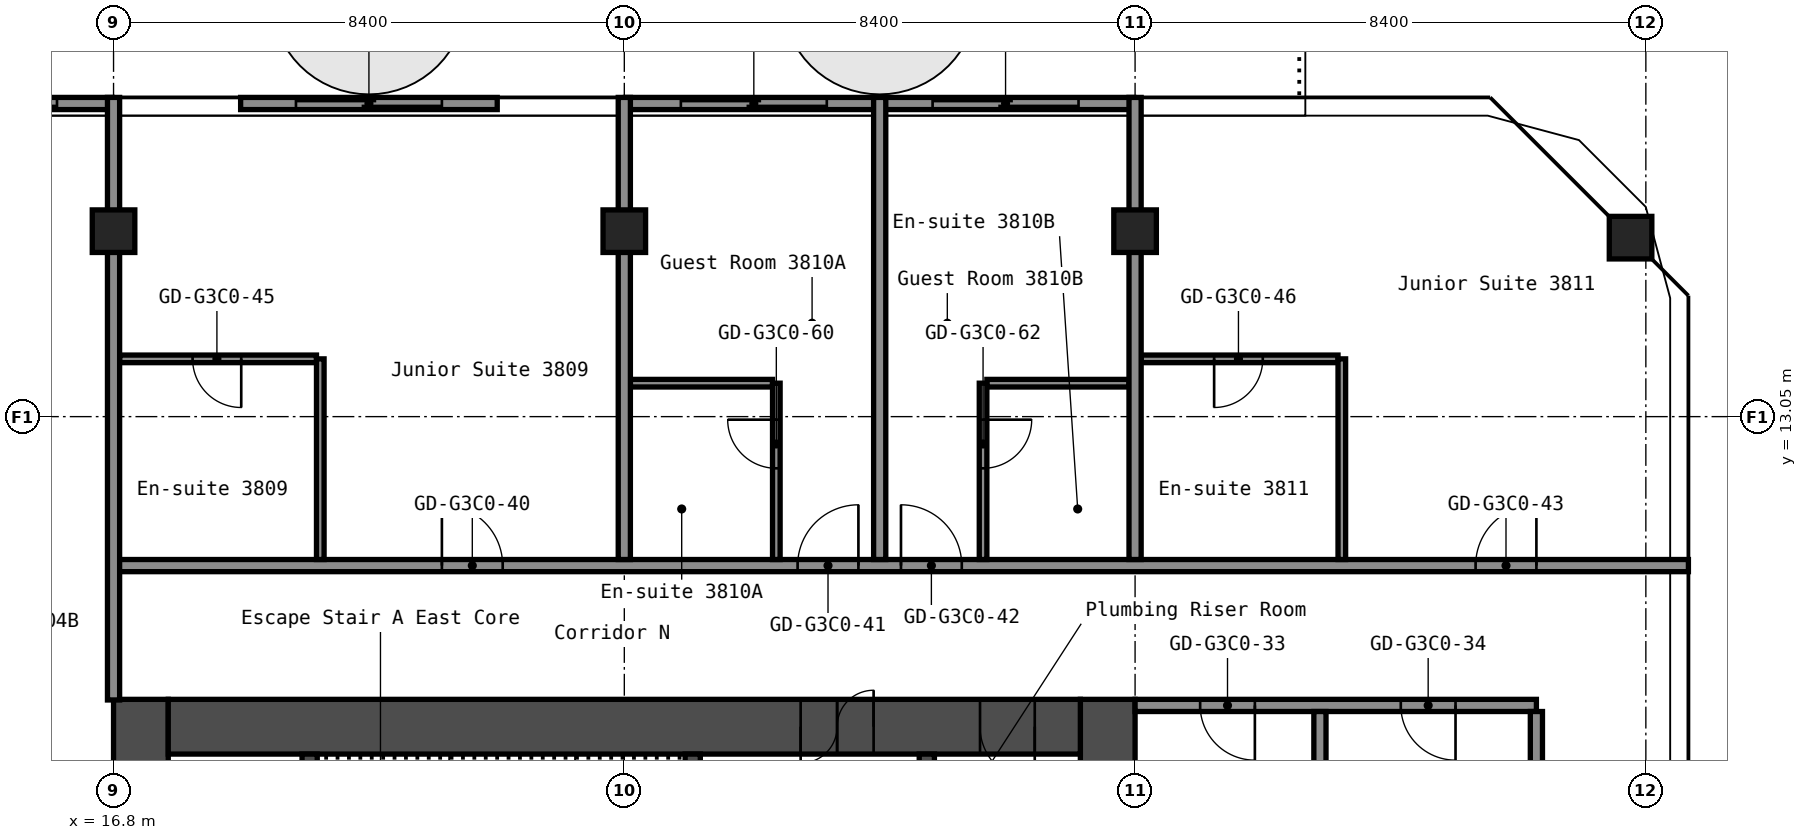
"""IFC4 building model, lengths in metres.
Left out: names, types, materials, properties, quantities, classifications, styles, units other than length and angle.
Written with IfcOpenShell. Run it as: python <this file> out.ifc"""

import sys

from ifc_helpers import new_model, si_unit, direction, frame, frame_2d, origin, origin_2d, place, context, subcontext, project, spatial, rectangle, hollow_rectangle, extrude, element, fill, save


model = new_model("IFC4")
c1 = context("Model", 3, precision=1e-05, world=origin(), true_north=direction((0.0, 1.0)))
c2 = subcontext(c1, "Body", "Model", "MODEL_VIEW")
j1 = project(units=[si_unit("LENGTHUNIT", "METRE"), si_unit("PLANEANGLEUNIT", "RADIAN")], contexts=[c1])
p1 = place(None, origin())
s1 = spatial("IfcSite", under=j1, at=p1, CompositionType="ELEMENT")
p2 = place(p1, origin())
s2 = spatial("IfcBuilding", under=s1, at=p2, CompositionType="ELEMENT")
p3 = place(p2, frame((0.0, 0.0, 137.4)))
s3 = spatial("IfcBuildingStorey", under=s2, at=p3, CompositionType="ELEMENT", Elevation=137.4)
for number, where, z_axis, x_axis in (
    (1, (16.8, 16.1, 0.0), (0.0, 0.0, 1.0), (1.0, 0.0, 0.0)),
    (2, (25.2, 16.1, 0.0), (0.0, 0.0, 1.0), (1.0, 0.0, 0.0)),
    (3, (33.6, 16.1, 0.0), (0.0, 0.0, 1.0), (1.0, 0.0, 0.0)),
    (4, (41.749, 15.994, 0.0), (0.0, 0.0, 1.0), (1.0, 0.0, 0.0)),
):
    element("IfcColumn", number, at=place(p3, frame(where, z_axis=z_axis, x_axis=x_axis)), inside=s3, PredefinedType="COLUMN", context=c2, shape_type="SweptSolid", body=[
        extrude(hollow_rectangle(XDim=0.7, YDim=0.7, WallThickness=0.028, at=origin_2d()), origin(), (0.0, 0.0, 1.0), 2.75),
    ])
p4 = place(p3, frame((17.25, -8.4, 0.0), z_axis=(0.0, 0.0, 1.0), x_axis=(0.0, 1.0, 0.0)))
e5 = element("IfcWall", 5, at=p4, inside=s3, PredefinedType="SHEAR", context=c2, shape_type="SweptSolid", body=[
    extrude(rectangle(XDim=16.8, YDim=0.9, at=frame_2d((8.4, 0.0))), origin(), (0.0, 0.0, 1.0), 2.75),
])
p5 = place(p4, frame((7.1, 0.0, 0.0)))
e6 = element("IfcOpeningElement", 6, at=p5, cuts=e5, PredefinedType="OPENING", context=c2, shape_type="SweptSolid", body=[
    extrude(rectangle(XDim=1.6, YDim=2.1, at=frame_2d((0.8, 1.05))), frame((0.0, 0.46, 0.0), z_axis=(0.0, -1.0, 0.0), x_axis=(1.0, 0.0, 0.0)), (0.0, 0.0, 1.0), 0.92),
])
p6 = place(p3, frame((33.15, -8.4, 0.0), z_axis=(0.0, 0.0, 1.0), x_axis=(0.0, 1.0, 0.0)))
e7 = element("IfcWall", 7, at=p6, inside=s3, PredefinedType="SHEAR", context=c2, shape_type="SweptSolid", body=[
    extrude(rectangle(XDim=16.8, YDim=0.9, at=frame_2d((8.4, 0.0))), origin(), (0.0, 0.0, 1.0), 2.75),
])
p7 = place(p3, frame((17.7, 7.95, 0.0), z_axis=(0.0, 0.0, 1.0), x_axis=(1.0, 0.0, 0.0)))
e8 = element("IfcWall", 8, at=p7, inside=s3, PredefinedType="SHEAR", context=c2, shape_type="SweptSolid", body=[
    extrude(rectangle(XDim=15.0, YDim=0.9, at=frame_2d((7.5, 0.0))), origin(), (0.0, 0.0, 1.0), 2.75),
])
p8 = place(p7, frame((10.4, 0.0, 0.0)))
e9 = element("IfcOpeningElement", 9, at=p8, cuts=e8, PredefinedType="OPENING", context=c2, shape_type="SweptSolid", body=[
    extrude(rectangle(XDim=1.2, YDim=2.1, at=frame_2d((0.6, 1.05))), frame((0.0, 0.46, 0.0), z_axis=(0.0, -1.0, 0.0), x_axis=(1.0, 0.0, 0.0)), (0.0, 0.0, 1.0), 0.92),
])
p9 = place(p7, frame((13.35, 0.0, 0.0)))
e10 = element("IfcOpeningElement", 10, at=p9, cuts=e8, PredefinedType="OPENING", context=c2, shape_type="SweptSolid", body=[
    extrude(rectangle(XDim=0.9, YDim=2.1, at=frame_2d((0.45, 1.05))), frame((0.0, 0.46, 0.0), z_axis=(0.0, -1.0, 0.0), x_axis=(1.0, 0.0, 0.0)), (0.0, 0.0, 1.0), 0.92),
])
p10 = place(p3, frame((20.025, 1.2, 0.0), z_axis=(0.0, 0.0, 1.0), x_axis=(0.0, 1.0, 0.0)))
e11 = element("IfcWall", 11, at=p10, inside=s3, PredefinedType="SHEAR", context=c2, shape_type="SweptSolid", body=[
    extrude(rectangle(XDim=6.3, YDim=0.25, at=frame_2d((3.15, 0.0))), origin(), (0.0, 0.0, 1.0), 2.75),
])
p11 = place(p3, frame((26.325, 3.75, 0.0), z_axis=(0.0, 0.0, 1.0), x_axis=(0.0, 1.0, 0.0)))
e12 = element("IfcWall", 12, at=p11, inside=s3, PredefinedType="SHEAR", context=c2, shape_type="SweptSolid", body=[
    extrude(rectangle(XDim=3.75, YDim=0.25, at=frame_2d((1.875, 0.0))), origin(), (0.0, 0.0, 1.0), 2.75),
])
p12 = place(p11, frame((1.25, 0.0, 0.0)))
e13 = element("IfcOpeningElement", 13, at=p12, cuts=e12, PredefinedType="OPENING", context=c2, shape_type="SweptSolid", body=[
    extrude(rectangle(XDim=1.2, YDim=2.1, at=frame_2d((0.6, 1.05))), frame((0.0, 0.135, 0.0), z_axis=(0.0, -1.0, 0.0), x_axis=(1.0, 0.0, 0.0)), (0.0, 0.0, 1.0), 0.27),
])
p13 = place(p3, frame((30.175, 1.45, 0.0), z_axis=(0.0, 0.0, 1.0), x_axis=(0.0, 1.0, 0.0)))
e14 = element("IfcWall", 14, at=p13, inside=s3, PredefinedType="SHEAR", context=c2, shape_type="SweptSolid", body=[
    extrude(rectangle(XDim=6.05, YDim=0.25, at=frame_2d((3.025, 0.0))), origin(), (0.0, 0.0, 1.0), 2.75),
])
p14 = place(p13, frame((2.625, 0.0, 0.0)))
e15 = element("IfcOpeningElement", 15, at=p14, cuts=e14, PredefinedType="OPENING", context=c2, shape_type="SweptSolid", body=[
    extrude(rectangle(XDim=1.1, YDim=2.1, at=frame_2d((0.55, 1.05))), frame((0.0, 0.135, 0.0), z_axis=(0.0, -1.0, 0.0), x_axis=(1.0, 0.0, 0.0)), (0.0, 0.0, 1.0), 0.27),
])
p15 = place(p3, frame((33.6, 8.3, 0.0), z_axis=(0.0, 0.0, 1.0), x_axis=(1.0, 0.0, 0.0)))
e16 = element("IfcWall", 16, at=p15, inside=s3, PredefinedType="PARTITIONING", context=c2, shape_type="SweptSolid", body=[
    extrude(rectangle(XDim=6.6, YDim=0.2, at=frame_2d((3.3, 0.0))), origin(), (0.0, 0.0, 1.0), 2.75),
])
p16 = place(p15, frame((1.07, 0.0, 0.0)))
e17 = element("IfcOpeningElement", 17, at=p16, cuts=e16, PredefinedType="OPENING", context=c2, shape_type="SweptSolid", body=[
    extrude(rectangle(XDim=0.9, YDim=2.1, at=frame_2d((0.45, 1.05))), frame((0.0, 0.11, 0.0), z_axis=(0.0, -1.0, 0.0), x_axis=(1.0, 0.0, 0.0)), (0.0, 0.0, 1.0), 0.22),
])
p17 = place(p15, frame((4.37, 0.0, 0.0)))
e18 = element("IfcOpeningElement", 18, at=p17, cuts=e16, PredefinedType="OPENING", context=c2, shape_type="SweptSolid", body=[
    extrude(rectangle(XDim=0.9, YDim=2.1, at=frame_2d((0.45, 1.05))), frame((0.0, 0.11, 0.0), z_axis=(0.0, -1.0, 0.0), x_axis=(1.0, 0.0, 0.0)), (0.0, 0.0, 1.0), 0.22),
])
p18 = place(p3, frame((16.8, 10.6, 0.0), z_axis=(0.0, 0.0, 1.0), x_axis=(1.0, 0.0, 0.0)))
e19 = element("IfcWall", 19, at=p18, inside=s3, PredefinedType="PARTITIONING", context=c2, shape_type="SweptSolid", body=[
    extrude(rectangle(XDim=25.9, YDim=0.2, at=frame_2d((12.95, 0.0))), origin(), (0.0, 0.0, 1.0), 2.75),
])
p19 = place(p18, frame((5.4, 0.0, 0.0)))
e20 = element("IfcOpeningElement", 20, at=p19, cuts=e19, PredefinedType="OPENING", context=c2, shape_type="SweptSolid", body=[
    extrude(rectangle(XDim=1.0, YDim=2.1, at=frame_2d((0.5, 1.05))), frame((0.0, 0.11, 0.0), z_axis=(0.0, -1.0, 0.0), x_axis=(1.0, 0.0, 0.0)), (0.0, 0.0, 1.0), 0.22),
])
p20 = place(p18, frame((11.25, 0.0, 0.0)))
e21 = element("IfcOpeningElement", 21, at=p20, cuts=e19, PredefinedType="OPENING", context=c2, shape_type="SweptSolid", body=[
    extrude(rectangle(XDim=1.0, YDim=2.1, at=frame_2d((0.5, 1.05))), frame((0.0, 0.11, 0.0), z_axis=(0.0, -1.0, 0.0), x_axis=(1.0, 0.0, 0.0)), (0.0, 0.0, 1.0), 0.22),
])
p21 = place(p18, frame((12.95, 0.0, 0.0)))
e22 = element("IfcOpeningElement", 22, at=p21, cuts=e19, PredefinedType="OPENING", context=c2, shape_type="SweptSolid", body=[
    extrude(rectangle(XDim=1.0, YDim=2.1, at=frame_2d((0.5, 1.05))), frame((0.0, 0.11, 0.0), z_axis=(0.0, -1.0, 0.0), x_axis=(1.0, 0.0, 0.0)), (0.0, 0.0, 1.0), 0.22),
])
p22 = place(p18, frame((22.4, 0.0, 0.0)))
e23 = element("IfcOpeningElement", 23, at=p22, cuts=e19, PredefinedType="OPENING", context=c2, shape_type="SweptSolid", body=[
    extrude(rectangle(XDim=1.0, YDim=2.1, at=frame_2d((0.5, 1.05))), frame((0.0, 0.11, 0.0), z_axis=(0.0, -1.0, 0.0), x_axis=(1.0, 0.0, 0.0)), (0.0, 0.0, 1.0), 0.22),
])
for number, where, z_axis, x_axis in (
    (24, (25.3, 13.6, 0.0), (0.0, 0.0, 1.0), (1.0, 0.0, 0.0)),
    (25, (31.163, 13.6, 0.0), (0.0, 0.0, 1.0), (1.0, 0.0, 0.0)),
):
    element("IfcWall", number, at=place(p3, frame(where, z_axis=z_axis, x_axis=x_axis)), inside=s3, PredefinedType="PARTITIONING", context=c2, shape_type="SweptSolid", body=[
        extrude(rectangle(XDim=2.337, YDim=0.125, at=frame_2d((1.169, 0.0))), origin(), (0.0, 0.0, 1.0), 2.75),
    ])
p23 = place(p3, frame((16.9, 14.0, 0.0), z_axis=(0.0, 0.0, 1.0), x_axis=(1.0, 0.0, 0.0)))
e26 = element("IfcWall", 26, at=p23, inside=s3, PredefinedType="PARTITIONING", context=c2, shape_type="SweptSolid", body=[
    extrude(rectangle(XDim=3.238, YDim=0.125, at=frame_2d((1.619, 0.0))), origin(), (0.0, 0.0, 1.0), 2.75),
])
p24 = place(p23, frame((1.2, 0.0, 0.0)))
e27 = element("IfcOpeningElement", 27, at=p24, cuts=e26, PredefinedType="OPENING", context=c2, shape_type="SweptSolid", body=[
    extrude(rectangle(XDim=0.8, YDim=2.1, at=frame_2d((0.4, 1.05))), frame((0.0, 0.073, 0.0), z_axis=(0.0, -1.0, 0.0), x_axis=(1.0, 0.0, 0.0)), (0.0, 0.0, 1.0), 0.145),
])
p25 = place(p3, frame((33.7, 14.0, 0.0), z_axis=(0.0, 0.0, 1.0), x_axis=(1.0, 0.0, 0.0)))
e28 = element("IfcWall", 28, at=p25, inside=s3, PredefinedType="PARTITIONING", context=c2, shape_type="SweptSolid", body=[
    extrude(rectangle(XDim=3.238, YDim=0.125, at=frame_2d((1.619, 0.0))), origin(), (0.0, 0.0, 1.0), 2.75),
])
p26 = place(p25, frame((1.2, 0.0, 0.0)))
e29 = element("IfcOpeningElement", 29, at=p26, cuts=e28, PredefinedType="OPENING", context=c2, shape_type="SweptSolid", body=[
    extrude(rectangle(XDim=0.8, YDim=2.1, at=frame_2d((0.4, 1.05))), frame((0.0, 0.073, 0.0), z_axis=(0.0, -1.0, 0.0), x_axis=(1.0, 0.0, 0.0)), (0.0, 0.0, 1.0), 0.145),
])
p27 = place(p3, frame((16.8, 8.39, 0.0), z_axis=(0.0, 0.0, 1.0), x_axis=(0.0, 1.0, 0.0)))
e30 = element("IfcWall", 30, at=p27, inside=s3, PredefinedType="PARTITIONING", context=c2, shape_type="SweptSolid", body=[
    extrude(rectangle(XDim=9.91, YDim=0.2, at=frame_2d((4.955, 0.0))), origin(), (0.0, 0.0, 1.0), 2.75),
])
p28 = place(p3, frame((20.2, 10.7, 0.0), z_axis=(0.0, 0.0, 1.0), x_axis=(0.0, 1.0, 0.0)))
e31 = element("IfcWall", 31, at=p28, inside=s3, PredefinedType="PARTITIONING", context=c2, shape_type="SweptSolid", body=[
    extrude(rectangle(XDim=3.3, YDim=0.125, at=frame_2d((1.65, 0.0))), origin(), (0.0, 0.0, 1.0), 2.75),
])
p29 = place(p3, frame((25.2, 10.7, 0.0), z_axis=(0.0, 0.0, 1.0), x_axis=(0.0, 1.0, 0.0)))
e32 = element("IfcWall", 32, at=p29, inside=s3, PredefinedType="PARTITIONING", context=c2, shape_type="SweptSolid", body=[
    extrude(rectangle(XDim=7.6, YDim=0.2, at=frame_2d((3.8, 0.0))), origin(), (0.0, 0.0, 1.0), 2.75),
])
p30 = place(p3, frame((27.7, 10.7, 0.0), z_axis=(0.0, 0.0, 1.0), x_axis=(0.0, 1.0, 0.0)))
e33 = element("IfcWall", 33, at=p30, inside=s3, PredefinedType="PARTITIONING", context=c2, shape_type="SweptSolid", body=[
    extrude(rectangle(XDim=2.9, YDim=0.125, at=frame_2d((1.45, 0.0))), origin(), (0.0, 0.0, 1.0), 2.75),
])
p31 = place(p30, frame((1.5, 0.0, 0.0)))
e34 = element("IfcOpeningElement", 34, at=p31, cuts=e33, PredefinedType="OPENING", context=c2, shape_type="SweptSolid", body=[
    extrude(rectangle(XDim=0.8, YDim=2.1, at=frame_2d((0.4, 1.05))), frame((0.0, 0.073, 0.0), z_axis=(0.0, -1.0, 0.0), x_axis=(1.0, 0.0, 0.0)), (0.0, 0.0, 1.0), 0.145),
])
p32 = place(p3, frame((29.4, 10.7, 0.0), z_axis=(0.0, 0.0, 1.0), x_axis=(0.0, 1.0, 0.0)))
e35 = element("IfcWall", 35, at=p32, inside=s3, PredefinedType="PARTITIONING", context=c2, shape_type="SweptSolid", body=[
    extrude(rectangle(XDim=7.6, YDim=0.2, at=frame_2d((3.8, 0.0))), origin(), (0.0, 0.0, 1.0), 2.75),
])
p33 = place(p3, frame((31.1, 10.7, 0.0), z_axis=(0.0, 0.0, 1.0), x_axis=(0.0, 1.0, 0.0)))
e36 = element("IfcWall", 36, at=p33, inside=s3, PredefinedType="PARTITIONING", context=c2, shape_type="SweptSolid", body=[
    extrude(rectangle(XDim=2.9, YDim=0.125, at=frame_2d((1.45, 0.0))), origin(), (0.0, 0.0, 1.0), 2.75),
])
p34 = place(p33, frame((1.5, 0.0, 0.0)))
e37 = element("IfcOpeningElement", 37, at=p34, cuts=e36, PredefinedType="OPENING", context=c2, shape_type="SweptSolid", body=[
    extrude(rectangle(XDim=0.8, YDim=2.1, at=frame_2d((0.4, 1.05))), frame((0.0, 0.073, 0.0), z_axis=(0.0, -1.0, 0.0), x_axis=(1.0, 0.0, 0.0)), (0.0, 0.0, 1.0), 0.145),
])
p35 = place(p3, frame((33.6, 10.7, 0.0), z_axis=(0.0, 0.0, 1.0), x_axis=(0.0, 1.0, 0.0)))
e38 = element("IfcWall", 38, at=p35, inside=s3, PredefinedType="PARTITIONING", context=c2, shape_type="SweptSolid", body=[
    extrude(rectangle(XDim=7.6, YDim=0.2, at=frame_2d((3.8, 0.0))), origin(), (0.0, 0.0, 1.0), 2.75),
])
p36 = place(p3, frame((36.64, 0.0, 0.0), z_axis=(0.0, 0.0, 1.0), x_axis=(0.0, 1.0, 0.0)))
e39 = element("IfcWall", 39, at=p36, inside=s3, PredefinedType="PARTITIONING", context=c2, shape_type="SweptSolid", body=[
    extrude(rectangle(XDim=8.2, YDim=0.2, at=frame_2d((4.1, 0.0))), origin(), (0.0, 0.0, 1.0), 2.75),
])
p37 = place(p3, frame((37.0, 10.7, 0.0), z_axis=(0.0, 0.0, 1.0), x_axis=(0.0, 1.0, 0.0)))
e40 = element("IfcWall", 40, at=p37, inside=s3, PredefinedType="PARTITIONING", context=c2, shape_type="SweptSolid", body=[
    extrude(rectangle(XDim=3.3, YDim=0.125, at=frame_2d((1.65, 0.0))), origin(), (0.0, 0.0, 1.0), 2.75),
])
p38 = place(p3, frame((40.2, -8.2, 0.0), z_axis=(0.0, 0.0, 1.0), x_axis=(0.0, 1.0, 0.0)))
e41 = element("IfcWall", 41, at=p38, inside=s3, PredefinedType="PARTITIONING", context=c2, shape_type="SweptSolid", body=[
    extrude(rectangle(XDim=16.4, YDim=0.2, at=frame_2d((8.2, 0.0))), origin(), (0.0, 0.0, 1.0), 2.75),
])
p39 = place(p3, frame((33.58, 18.2, 0.0), z_axis=(0.0, 0.0, 1.0), x_axis=(-1.0, 0.0, 0.0)))
p40 = place(p39, frame((0.91, 0.0, 0.0)))
p41 = place(p40, frame((2.4, 0.0, 0.0), z_axis=(0.0, 0.0, 1.0), x_axis=(-1.0, 0.0, 0.0)))
e42 = element("IfcDoor", 42, at=p41, inside=s3, OperationType="SLIDING_TO_LEFT", PredefinedType="DOOR", context=c2, shape_type="SweptSolid", body=[
    extrude(rectangle(XDim=2.4, YDim=2.2, at=frame_2d((1.2, 1.1))), frame((0.0, 0.025, 0.0), z_axis=(0.0, -1.0, 0.0), x_axis=(1.0, 0.0, 0.0)), (0.0, 0.0, 1.0), 0.05),
])
p42 = place(p3, frame((29.44, 18.2, 0.0), z_axis=(0.0, 0.0, 1.0), x_axis=(-1.0, 0.0, 0.0)))
p43 = place(p42, frame((0.91, 0.0, 0.0)))
p44 = place(p43, frame((2.4, 0.0, 0.0), z_axis=(0.0, 0.0, 1.0), x_axis=(-1.0, 0.0, 0.0)))
e43 = element("IfcDoor", 43, at=p44, inside=s3, OperationType="SLIDING_TO_LEFT", PredefinedType="DOOR", context=c2, shape_type="SweptSolid", body=[
    extrude(rectangle(XDim=2.4, YDim=2.2, at=frame_2d((1.2, 1.1))), frame((0.0, 0.025, 0.0), z_axis=(0.0, -1.0, 0.0), x_axis=(1.0, 0.0, 0.0)), (0.0, 0.0, 1.0), 0.05),
])
p45 = place(p3, frame((23.11, 18.2, 0.0), z_axis=(0.0, 0.0, 1.0), x_axis=(-1.0, 0.0, 0.0)))
p46 = place(p45, frame((0.91, 0.0, 0.0)))
p47 = place(p46, frame((2.4, 0.0, 0.0), z_axis=(0.0, 0.0, 1.0), x_axis=(-1.0, 0.0, 0.0)))
e44 = element("IfcDoor", 44, at=p47, inside=s3, OperationType="SLIDING_TO_LEFT", PredefinedType="DOOR", context=c2, shape_type="SweptSolid", body=[
    extrude(rectangle(XDim=2.4, YDim=2.2, at=frame_2d((1.2, 1.1))), frame((0.0, 0.025, 0.0), z_axis=(0.0, -1.0, 0.0), x_axis=(1.0, 0.0, 0.0)), (0.0, 0.0, 1.0), 0.05),
])
p48 = place(p3, frame((16.78, 18.2, 0.0), z_axis=(0.0, 0.0, 1.0), x_axis=(-1.0, 0.0, 0.0)))
p49 = place(p48, frame((0.91, 0.0, 0.0)))
p50 = place(p49, frame((2.4, 0.0, 0.0), z_axis=(0.0, 0.0, 1.0), x_axis=(-1.0, 0.0, 0.0)))
e45 = element("IfcDoor", 45, at=p50, inside=s3, OperationType="SLIDING_TO_LEFT", PredefinedType="DOOR", context=c2, shape_type="SweptSolid", body=[
    extrude(rectangle(XDim=2.4, YDim=2.2, at=frame_2d((1.2, 1.1))), frame((0.0, 0.025, 0.0), z_axis=(0.0, -1.0, 0.0), x_axis=(1.0, 0.0, 0.0)), (0.0, 0.0, 1.0), 0.05),
])
p51 = place(p8, origin())
e46 = element("IfcDoor", 46, at=p51, inside=s3, OperationType="DOUBLE_DOOR_SINGLE_SWING", PredefinedType="DOOR", context=c2, shape_type="SweptSolid", body=[
    extrude(rectangle(XDim=1.2, YDim=2.1, at=frame_2d((0.6, 1.05))), frame((0.0, 0.025, 0.0), z_axis=(0.0, -1.0, 0.0), x_axis=(1.0, 0.0, 0.0)), (0.0, 0.0, 1.0), 0.05),
])
fill(e9, e46)
p52 = place(p9, origin())
e47 = element("IfcDoor", 47, at=p52, inside=s3, OperationType="SINGLE_SWING_RIGHT", PredefinedType="DOOR", context=c2, shape_type="SweptSolid", body=[
    extrude(rectangle(XDim=0.9, YDim=2.1, at=frame_2d((0.45, 1.05))), frame((0.0, 0.025, 0.0), z_axis=(0.0, -1.0, 0.0), x_axis=(1.0, 0.0, 0.0)), (0.0, 0.0, 1.0), 0.05),
])
fill(e10, e47)
p53 = place(p16, origin())
e48 = element("IfcDoor", 48, at=p53, inside=s3, OperationType="SINGLE_SWING_RIGHT", PredefinedType="DOOR", context=c2, shape_type="SweptSolid", body=[
    extrude(rectangle(XDim=0.9, YDim=2.1, at=frame_2d((0.45, 1.05))), frame((0.0, 0.025, 0.0), z_axis=(0.0, -1.0, 0.0), x_axis=(1.0, 0.0, 0.0)), (0.0, 0.0, 1.0), 0.05),
])
fill(e17, e48)
p54 = place(p17, origin())
e49 = element("IfcDoor", 49, at=p54, inside=s3, OperationType="SINGLE_SWING_RIGHT", PredefinedType="DOOR", context=c2, shape_type="SweptSolid", body=[
    extrude(rectangle(XDim=0.9, YDim=2.1, at=frame_2d((0.45, 1.05))), frame((0.0, 0.025, 0.0), z_axis=(0.0, -1.0, 0.0), x_axis=(1.0, 0.0, 0.0)), (0.0, 0.0, 1.0), 0.05),
])
fill(e18, e49)
p55 = place(p19, origin())
e50 = element("IfcDoor", 50, at=p55, inside=s3, OperationType="SINGLE_SWING_RIGHT", PredefinedType="DOOR", context=c2, shape_type="SweptSolid", body=[
    extrude(rectangle(XDim=1.0, YDim=2.1, at=frame_2d((0.5, 1.05))), frame((0.0, 0.025, 0.0), z_axis=(0.0, -1.0, 0.0), x_axis=(1.0, 0.0, 0.0)), (0.0, 0.0, 1.0), 0.05),
])
fill(e20, e50)
p56 = place(p20, origin())
e51 = element("IfcDoor", 51, at=p56, inside=s3, OperationType="SINGLE_SWING_LEFT", PredefinedType="DOOR", context=c2, shape_type="SweptSolid", body=[
    extrude(rectangle(XDim=1.0, YDim=2.1, at=frame_2d((0.5, 1.05))), frame((0.0, 0.025, 0.0), z_axis=(0.0, -1.0, 0.0), x_axis=(1.0, 0.0, 0.0)), (0.0, 0.0, 1.0), 0.05),
])
fill(e21, e51)
p57 = place(p21, origin())
e52 = element("IfcDoor", 52, at=p57, inside=s3, OperationType="SINGLE_SWING_RIGHT", PredefinedType="DOOR", context=c2, shape_type="SweptSolid", body=[
    extrude(rectangle(XDim=1.0, YDim=2.1, at=frame_2d((0.5, 1.05))), frame((0.0, 0.025, 0.0), z_axis=(0.0, -1.0, 0.0), x_axis=(1.0, 0.0, 0.0)), (0.0, 0.0, 1.0), 0.05),
])
fill(e22, e52)
p58 = place(p22, origin())
e53 = element("IfcDoor", 53, at=p58, inside=s3, OperationType="SINGLE_SWING_LEFT", PredefinedType="DOOR", context=c2, shape_type="SweptSolid", body=[
    extrude(rectangle(XDim=1.0, YDim=2.1, at=frame_2d((0.5, 1.05))), frame((0.0, 0.025, 0.0), z_axis=(0.0, -1.0, 0.0), x_axis=(1.0, 0.0, 0.0)), (0.0, 0.0, 1.0), 0.05),
])
fill(e23, e53)
p59 = place(p24, origin())
e54 = element("IfcDoor", 54, at=p59, inside=s3, OperationType="SINGLE_SWING_RIGHT", PredefinedType="DOOR", context=c2, shape_type="SweptSolid", body=[
    extrude(rectangle(XDim=0.8, YDim=2.1, at=frame_2d((0.4, 1.05))), frame((0.0, 0.025, 0.0), z_axis=(0.0, -1.0, 0.0), x_axis=(1.0, 0.0, 0.0)), (0.0, 0.0, 1.0), 0.05),
])
fill(e27, e54)
p60 = place(p26, origin())
e55 = element("IfcDoor", 55, at=p60, inside=s3, OperationType="SINGLE_SWING_LEFT", PredefinedType="DOOR", context=c2, shape_type="SweptSolid", body=[
    extrude(rectangle(XDim=0.8, YDim=2.1, at=frame_2d((0.4, 1.05))), frame((0.0, 0.025, 0.0), z_axis=(0.0, -1.0, 0.0), x_axis=(1.0, 0.0, 0.0)), (0.0, 0.0, 1.0), 0.05),
])
fill(e29, e55)
p61 = place(p31, origin())
e56 = element("IfcDoor", 56, at=p61, inside=s3, OperationType="SINGLE_SWING_LEFT", PredefinedType="DOOR", context=c2, shape_type="SweptSolid", body=[
    extrude(rectangle(XDim=0.8, YDim=2.1, at=frame_2d((0.4, 1.05))), frame((0.0, 0.025, 0.0), z_axis=(0.0, -1.0, 0.0), x_axis=(1.0, 0.0, 0.0)), (0.0, 0.0, 1.0), 0.05),
])
fill(e34, e56)
p62 = place(p34, origin())
e57 = element("IfcDoor", 57, at=p62, inside=s3, OperationType="SINGLE_SWING_RIGHT", PredefinedType="DOOR", context=c2, shape_type="SweptSolid", body=[
    extrude(rectangle(XDim=0.8, YDim=2.1, at=frame_2d((0.4, 1.05))), frame((0.0, 0.025, 0.0), z_axis=(0.0, -1.0, 0.0), x_axis=(1.0, 0.0, 0.0)), (0.0, 0.0, 1.0), 0.05),
])
fill(e37, e57)
save(model, sys.argv[1])
